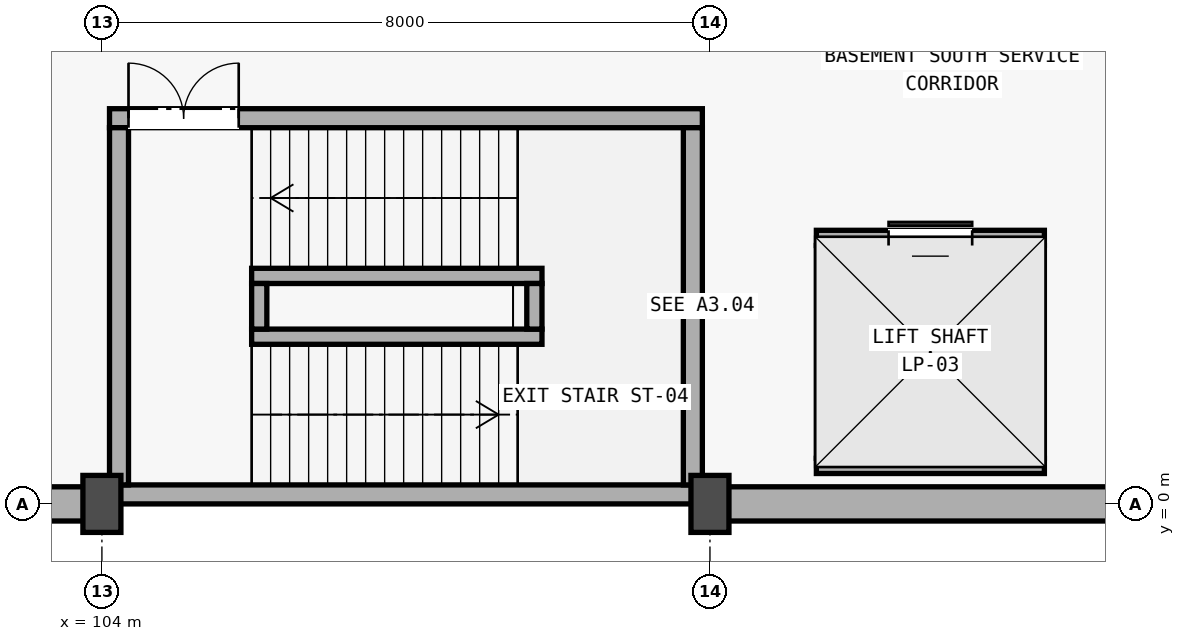
"""IFC4 building model, lengths in metres.
Left out: names, types, materials, properties, quantities, classifications, styles, units other than length and angle.
Written with IfcOpenShell. Run it as: python <this file> out.ifc"""

import sys

from ifc_helpers import new_model, si_unit, direction, frame, frame_2d, origin, origin_2d, place, context, subcontext, project, spatial, rectangle, extrude, element, fill, save


model = new_model("IFC4")
c1 = context("Model", 3, precision=1e-05, world=origin(), true_north=direction((0.0, 1.0)))
c2 = subcontext(c1, "Body", "Model", "MODEL_VIEW")
j1 = project(units=[si_unit("LENGTHUNIT", "METRE"), si_unit("PLANEANGLEUNIT", "RADIAN")], contexts=[c1])
p1 = place(None, origin())
s1 = spatial("IfcSite", under=j1, at=p1, CompositionType="ELEMENT")
p2 = place(p1, origin())
s2 = spatial("IfcBuilding", under=s1, at=p2, CompositionType="ELEMENT")
p3 = place(p2, frame((0.0, 0.0, -4.8)))
s3 = spatial("IfcBuildingStorey", under=s2, at=p3, CompositionType="ELEMENT", Elevation=-4.8)
for number, where, z_axis, x_axis in (
    (1, (104.0, 0.0, 0.0), (0.0, 0.0, 1.0), (1.0, 0.0, 0.0)),
    (2, (112.0, 0.0, 0.0), (0.0, 0.0, 1.0), (1.0, 0.0, 0.0)),
):
    element("IfcColumn", number, at=place(p3, frame(where, z_axis=z_axis, x_axis=x_axis)), inside=s3, PredefinedType="COLUMN", context=c2, shape_type="SweptSolid", body=[
        extrude(rectangle(XDim=0.5, YDim=0.75, at=origin_2d()), origin(), (0.0, 0.0, 1.0), 4.5),
    ])
p4 = place(p3, frame((96.0, 0.0, 0.0), z_axis=(0.0, 0.0, 1.0), x_axis=(1.0, 0.0, 0.0)))
e3 = element("IfcWall", 3, at=p4, inside=s3, PredefinedType="SOLIDWALL", context=c2, shape_type="SweptSolid", body=[
    extrude(rectangle(XDim=8.098, YDim=0.45, at=frame_2d((4.049, 0.0))), origin(), (0.0, 0.0, 1.0), 4.47),
])
p5 = place(p3, frame((111.902, 0.0, 0.0), z_axis=(0.0, 0.0, 1.0), x_axis=(1.0, 0.0, 0.0)))
e4 = element("IfcWall", 4, at=p5, inside=s3, PredefinedType="SOLIDWALL", context=c2, shape_type="SweptSolid", body=[
    extrude(rectangle(XDim=24.196, YDim=0.45, at=frame_2d((12.098, 0.0))), origin(), (0.0, 0.0, 1.0), 4.47),
])
p6 = place(p3, frame((104.1, 0.125, 0.0), z_axis=(0.0, 0.0, 1.0), x_axis=(1.0, 0.0, 0.0)))
e5 = element("IfcWall", 5, at=p6, inside=s3, PredefinedType="SHEAR", context=c2, shape_type="SweptSolid", body=[
    extrude(rectangle(XDim=7.8, YDim=0.25, at=frame_2d((3.9, 0.0))), origin(), (0.0, 0.0, 1.0), 4.8),
])
p7 = place(p3, frame((104.1, 5.075, 0.0), z_axis=(0.0, 0.0, 1.0), x_axis=(1.0, 0.0, 0.0)))
e6 = element("IfcWall", 6, at=p7, inside=s3, PredefinedType="SHEAR", context=c2, shape_type="SweptSolid", body=[
    extrude(rectangle(XDim=7.8, YDim=0.25, at=frame_2d((3.9, 0.0))), origin(), (0.0, 0.0, 1.0), 4.8),
])
p8 = place(p7, frame((0.25, 0.0, 0.0)))
e7 = element("IfcOpeningElement", 7, at=p8, cuts=e6, PredefinedType="OPENING", context=c2, shape_type="SweptSolid", body=[
    extrude(rectangle(XDim=1.45, YDim=2.2, at=frame_2d((0.725, 1.1))), frame((0.0, 0.135, 0.0), z_axis=(0.0, -1.0, 0.0), x_axis=(1.0, 0.0, 0.0)), (0.0, 0.0, 1.0), 0.27),
])
for number, where, z_axis, x_axis in (
    (8, (104.225, 0.25, 0.0), (0.0, 0.0, 1.0), (0.0, 1.0, 0.0)),
    (9, (111.775, 0.25, 0.0), (0.0, 0.0, 1.0), (0.0, 1.0, 0.0)),
):
    element("IfcWall", number, at=place(p3, frame(where, z_axis=z_axis, x_axis=x_axis)), inside=s3, PredefinedType="SHEAR", context=c2, shape_type="SweptSolid", body=[
        extrude(rectangle(XDim=4.7, YDim=0.25, at=frame_2d((2.35, 0.0))), origin(), (0.0, 0.0, 1.0), 4.8),
    ])
for number, where, z_axis, x_axis in (
    (10, (105.97, 2.2, 0.0), (0.0, 0.0, 1.0), (1.0, 0.0, 0.0)),
    (11, (105.97, 3.0, 0.0), (0.0, 0.0, 1.0), (1.0, 0.0, 0.0)),
):
    element("IfcWall", number, at=place(p3, frame(where, z_axis=z_axis, x_axis=x_axis)), inside=s3, PredefinedType="SHEAR", context=c2, shape_type="SweptSolid", body=[
        extrude(rectangle(XDim=3.82, YDim=0.2, at=frame_2d((1.91, 0.0))), origin(), (0.0, 0.0, 1.0), 4.8),
    ])
for number, where, z_axis, x_axis in (
    (12, (106.07, 2.3, 0.0), (0.0, 0.0, 1.0), (0.0, 1.0, 0.0)),
    (13, (109.69, 2.3, 0.0), (0.0, 0.0, 1.0), (0.0, 1.0, 0.0)),
):
    element("IfcWall", number, at=place(p3, frame(where, z_axis=z_axis, x_axis=x_axis)), inside=s3, PredefinedType="SHEAR", context=c2, shape_type="SweptSolid", body=[
        extrude(rectangle(XDim=0.6, YDim=0.2, at=frame_2d((0.3, 0.0))), origin(), (0.0, 0.0, 1.0), 4.8),
    ])
p9 = place(p3, frame((113.4, 0.5, 0.0), z_axis=(0.0, 0.0, 1.0), x_axis=(1.0, 0.0, 0.0)))
e14 = element("IfcWall", 14, at=p9, inside=s3, PredefinedType="SHEAR", context=c2, shape_type="SweptSolid", body=[
    extrude(rectangle(XDim=3.0, YDim=0.2, at=frame_2d((1.5, 0.0))), origin(), (0.0, 0.0, 1.0), 4.8),
])
p10 = place(p3, frame((113.4, 3.5, 0.0), z_axis=(0.0, 0.0, 1.0), x_axis=(1.0, 0.0, 0.0)))
e15 = element("IfcWall", 15, at=p10, inside=s3, PredefinedType="SHEAR", context=c2, shape_type="SweptSolid", body=[
    extrude(rectangle(XDim=3.0, YDim=0.2, at=frame_2d((1.5, 0.0))), origin(), (0.0, 0.0, 1.0), 4.8),
])
p11 = place(p10, frame((0.95, 0.0, 0.0)))
e16 = element("IfcOpeningElement", 16, at=p11, cuts=e15, PredefinedType="OPENING", context=c2, shape_type="SweptSolid", body=[
    extrude(rectangle(XDim=1.1, YDim=2.2, at=frame_2d((0.55, 1.1))), frame((0.0, 0.11, 0.0), z_axis=(0.0, -1.0, 0.0), x_axis=(1.0, 0.0, 0.0)), (0.0, 0.0, 1.0), 0.22),
])
for number, where, z_axis, x_axis in (
    (17, (113.5, 0.6, 0.0), (0.0, 0.0, 1.0), (0.0, 1.0, 0.0)),
    (18, (116.3, 0.6, 0.0), (0.0, 0.0, 1.0), (0.0, 1.0, 0.0)),
):
    element("IfcWall", number, at=place(p3, frame(where, z_axis=z_axis, x_axis=x_axis)), inside=s3, PredefinedType="SHEAR", context=c2, shape_type="SweptSolid", body=[
        extrude(rectangle(XDim=2.8, YDim=0.2, at=frame_2d((1.4, 0.0))), origin(), (0.0, 0.0, 1.0), 4.8),
    ])
p12 = place(p8, origin())
e19 = element("IfcDoor", 19, at=p12, inside=s3, OperationType="DOUBLE_DOOR_SINGLE_SWING", PredefinedType="DOOR", context=c2, shape_type="SweptSolid", body=[
    extrude(rectangle(XDim=1.45, YDim=2.2, at=frame_2d((0.725, 1.1))), frame((0.0, 0.025, 0.0), z_axis=(0.0, -1.0, 0.0), x_axis=(1.0, 0.0, 0.0)), (0.0, 0.0, 1.0), 0.05),
])
fill(e7, e19)
p13 = place(p11, origin())
e20 = element("IfcDoor", 20, at=p13, inside=s3, OperationType="SLIDING_TO_LEFT", PredefinedType="DOOR", context=c2, shape_type="SweptSolid", body=[
    extrude(rectangle(XDim=1.1, YDim=2.2, at=frame_2d((0.55, 1.1))), frame((0.0, 0.025, 0.0), z_axis=(0.0, -1.0, 0.0), x_axis=(1.0, 0.0, 0.0)), (0.0, 0.0, 1.0), 0.05),
])
fill(e16, e20)
save(model, sys.argv[1])
